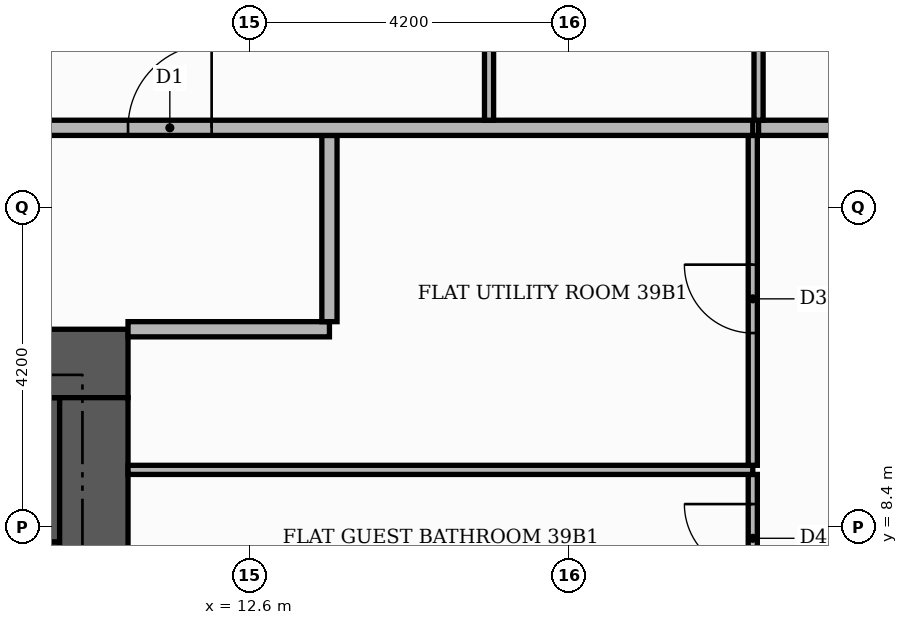
"""IFC4 building model, lengths in metres.
Left out: names, types, materials, properties, quantities, classifications, styles, units other than length and angle.
Written with IfcOpenShell. Run it as: python <this file> out.ifc"""

import sys

from ifc_helpers import new_model, si_unit, direction, frame, frame_2d, origin, place, context, subcontext, project, spatial, rectangle, extrude, element, fill, save


model = new_model("IFC4")
c1 = context("Model", 3, precision=1e-05, world=origin(), true_north=direction((0.0, 1.0)))
c2 = subcontext(c1, "Body", "Model", "MODEL_VIEW")
j1 = project(units=[si_unit("LENGTHUNIT", "METRE"), si_unit("PLANEANGLEUNIT", "RADIAN")], contexts=[c1])
p1 = place(None, origin())
s1 = spatial("IfcSite", under=j1, at=p1, CompositionType="ELEMENT")
p2 = place(p1, origin())
s2 = spatial("IfcBuilding", under=s1, at=p2, CompositionType="ELEMENT")
p3 = place(p2, frame((0.0, 0.0, 165.0)))
s3 = spatial("IfcBuildingStorey", under=s2, at=p3, CompositionType="ELEMENT", Elevation=165.0)
p4 = place(p3, frame((5.5, 9.15, 0.0), z_axis=(0.0, 0.0, 1.0), x_axis=(1.0, 0.0, 0.0)))
e1 = element("IfcWall", 1, at=p4, inside=s3, PredefinedType="SHEAR", context=c2, shape_type="SweptSolid", body=[
    extrude(rectangle(XDim=4.6, YDim=1.9, at=frame_2d((2.3, 0.0))), origin(), (0.0, 0.0, 1.0), 3.48),
])
p5 = place(p3, frame((8.1, 8.1, 0.0), z_axis=(0.0, 0.0, 1.0), x_axis=(1.0, 0.0, 0.0)))
e2 = element("IfcWall", 2, at=p5, inside=s3, PredefinedType="SHEAR", context=c2, shape_type="SweptSolid", body=[
    extrude(rectangle(XDim=2.0, YDim=0.2, at=frame_2d((1.0, 0.0))), origin(), (0.0, 0.0, 1.0), 3.48),
])
p6 = place(p3, frame((-11.0, 10.55, 0.0), z_axis=(0.0, 0.0, 1.0), x_axis=(1.0, 0.0, 0.0)))
e3 = element("IfcWall", 3, at=p6, inside=s3, PredefinedType="SHEAR", context=c2, shape_type="SweptSolid", body=[
    extrude(rectangle(XDim=22.0, YDim=0.9, at=frame_2d((11.0, 0.0))), origin(), (0.0, 0.0, 1.0), 3.48),
])
p7 = place(p6, frame((13.3, 0.0, 0.0)))
e4 = element("IfcOpeningElement", 4, at=p7, cuts=e3, PredefinedType="OPENING", context=c2, shape_type="SweptSolid", body=[
    extrude(rectangle(XDim=1.8, YDim=2.2, at=frame_2d((0.9, 1.1))), frame((0.0, 0.46, 0.0), z_axis=(0.0, -1.0, 0.0), x_axis=(1.0, 0.0, 0.0)), (0.0, 0.0, 1.0), 0.92),
])
p8 = place(p3, frame((10.55, -10.1, 0.0), z_axis=(0.0, 0.0, 1.0), x_axis=(0.0, 1.0, 0.0)))
e5 = element("IfcWall", 5, at=p8, inside=s3, PredefinedType="SHEAR", context=c2, shape_type="SweptSolid", body=[
    extrude(rectangle(XDim=20.2, YDim=0.9, at=frame_2d((10.1, 0.0))), origin(), (0.0, 0.0, 1.0), 3.48),
])
p9 = place(p3, frame((19.22, 7.41, 0.0), z_axis=(0.0, 0.0, 1.0), x_axis=(0.0, 1.0, 0.0)))
e6 = element("IfcWall", 6, at=p9, inside=s3, PredefinedType="PARTITIONING", context=c2, shape_type="SweptSolid", body=[
    extrude(rectangle(XDim=1.68, YDim=0.12, at=frame_2d((0.84, 0.0))), origin(), (0.0, 0.0, 1.0), 3.48),
])
p10 = place(p9, frame((0.39, 0.0, 0.0)))
e7 = element("IfcOpeningElement", 7, at=p10, cuts=e6, PredefinedType="OPENING", context=c2, shape_type="SweptSolid", body=[
    extrude(rectangle(XDim=0.9, YDim=2.1, at=frame_2d((0.45, 1.05))), frame((0.0, 0.07, 0.0), z_axis=(0.0, -1.0, 0.0), x_axis=(1.0, 0.0, 0.0)), (0.0, 0.0, 1.0), 0.14),
])
p11 = place(p3, frame((11.0, 9.15, 0.0), z_axis=(0.0, 0.0, 1.0), x_axis=(1.0, 0.0, 0.0)))
e8 = element("IfcWall", 8, at=p11, inside=s3, PredefinedType="PARTITIONING", context=c2, shape_type="SweptSolid", body=[
    extrude(rectangle(XDim=8.22, YDim=0.12, at=frame_2d((4.11, 0.0))), origin(), (0.0, 0.0, 1.0), 3.48),
])
p12 = place(p3, frame((19.22, 9.21, 0.0), z_axis=(0.0, 0.0, 1.0), x_axis=(0.0, 1.0, 0.0)))
e9 = element("IfcWall", 9, at=p12, inside=s3, PredefinedType="PARTITIONING", context=c2, shape_type="SweptSolid", body=[
    extrude(rectangle(XDim=4.34, YDim=0.12, at=frame_2d((2.17, 0.0))), origin(), (0.0, 0.0, 1.0), 3.48),
])
p13 = place(p12, frame((1.74, 0.0, 0.0)))
e10 = element("IfcOpeningElement", 10, at=p13, cuts=e9, PredefinedType="OPENING", context=c2, shape_type="SweptSolid", body=[
    extrude(rectangle(XDim=0.9, YDim=2.1, at=frame_2d((0.45, 1.05))), frame((0.0, 0.07, 0.0), z_axis=(0.0, -1.0, 0.0), x_axis=(1.0, 0.0, 0.0)), (0.0, 0.0, 1.0), 0.14),
])
p14 = place(p3, frame((11.0, 11.0, 0.0), z_axis=(0.0, 0.0, 1.0), x_axis=(1.0, 0.0, 0.0)))
e11 = element("IfcWall", 11, at=p14, inside=s3, PredefinedType="PARTITIONING", context=c2, shape_type="SweptSolid", body=[
    extrude(rectangle(XDim=2.65, YDim=0.2, at=frame_2d((1.325, 0.0))), origin(), (0.0, 0.0, 1.0), 3.48),
])
p15 = place(p3, frame((13.65, 11.1, 0.0), z_axis=(0.0, 0.0, 1.0), x_axis=(0.0, 1.0, 0.0)))
e12 = element("IfcWall", 12, at=p15, inside=s3, PredefinedType="PARTITIONING", context=c2, shape_type="SweptSolid", body=[
    extrude(rectangle(XDim=2.45, YDim=0.2, at=frame_2d((1.225, 0.0))), origin(), (0.0, 0.0, 1.0), 3.48),
])
p16 = place(p3, frame((-13.65, 13.65, 0.0), z_axis=(0.0, 0.0, 1.0), x_axis=(1.0, 0.0, 0.0)))
e13 = element("IfcWall", 13, at=p16, inside=s3, PredefinedType="PARTITIONING", context=c2, shape_type="SweptSolid", body=[
    extrude(rectangle(XDim=32.87, YDim=0.2, at=frame_2d((16.435, 0.0))), origin(), (0.0, 0.0, 1.0), 3.48),
])
p17 = place(p16, frame((24.65, 0.0, 0.0)))
e14 = element("IfcOpeningElement", 14, at=p17, cuts=e13, PredefinedType="OPENING", context=c2, shape_type="SweptSolid", body=[
    extrude(rectangle(XDim=1.1, YDim=2.4, at=frame_2d((0.55, 1.2))), frame((0.0, 0.11, 0.0), z_axis=(0.0, -1.0, 0.0), x_axis=(1.0, 0.0, 0.0)), (0.0, 0.0, 1.0), 0.22),
])
p18 = place(p16, frame((12.05, 0.0, 0.0)))
e15 = element("IfcOpeningElement", 15, at=p18, cuts=e13, PredefinedType="OPENING", context=c2, shape_type="SweptSolid", body=[
    extrude(rectangle(XDim=1.1, YDim=2.4, at=frame_2d((0.55, 1.2))), frame((0.0, 0.11, 0.0), z_axis=(0.0, -1.0, 0.0), x_axis=(1.0, 0.0, 0.0)), (0.0, 0.0, 1.0), 0.22),
])
p19 = place(p3, frame((19.296, 13.65, 0.0), z_axis=(0.0, 0.0, 1.0), x_axis=(1.0, 0.0, 0.0)))
e16 = element("IfcWall", 16, at=p19, inside=s3, PredefinedType="PARTITIONING", context=c2, shape_type="SweptSolid", body=[
    extrude(rectangle(XDim=6.124, YDim=0.2, at=frame_2d((3.062, 0.0))), origin(), (0.0, 0.0, 1.0), 3.48),
])
p20 = place(p3, frame((15.75, 13.75, 0.0), z_axis=(0.0, 0.0, 1.0), x_axis=(0.0, 1.0, 0.0)))
e17 = element("IfcWall", 17, at=p20, inside=s3, PredefinedType="PARTITIONING", context=c2, shape_type="SweptSolid", body=[
    extrude(rectangle(XDim=6.01, YDim=0.12, at=frame_2d((3.005, 0.0))), origin(), (0.0, 0.0, 1.0), 3.48),
])
p21 = place(p20, frame((2.485, 0.0, 0.0)))
e18 = element("IfcOpeningElement", 18, at=p21, cuts=e17, PredefinedType="OPENING", context=c2, shape_type="SweptSolid", body=[
    extrude(rectangle(XDim=1.0, YDim=2.1, at=frame_2d((0.5, 1.05))), frame((0.0, 0.07, 0.0), z_axis=(0.0, -1.0, 0.0), x_axis=(1.0, 0.0, 0.0)), (0.0, 0.0, 1.0), 0.14),
])
p22 = place(p3, frame((19.296, 13.75, 0.0), z_axis=(0.0, 0.0, 1.0), x_axis=(0.0, 1.0, 0.0)))
e19 = element("IfcWall", 19, at=p22, inside=s3, PredefinedType="PARTITIONING", context=c2, shape_type="SweptSolid", body=[
    extrude(rectangle(XDim=3.75, YDim=0.12, at=frame_2d((1.875, 0.0))), origin(), (0.0, 0.0, 1.0), 3.48),
])
p23 = place(p10, origin())
e20 = element("IfcDoor", 20, at=p23, inside=s3, OperationType="SINGLE_SWING_RIGHT", PredefinedType="DOOR", context=c2, shape_type="SweptSolid", body=[
    extrude(rectangle(XDim=0.9, YDim=2.1, at=frame_2d((0.45, 1.05))), frame((0.0, 0.025, 0.0), z_axis=(0.0, -1.0, 0.0), x_axis=(1.0, 0.0, 0.0)), (0.0, 0.0, 1.0), 0.05),
])
fill(e7, e20)
p24 = place(p13, origin())
e21 = element("IfcDoor", 21, at=p24, inside=s3, OperationType="SINGLE_SWING_RIGHT", PredefinedType="DOOR", context=c2, shape_type="SweptSolid", body=[
    extrude(rectangle(XDim=0.9, YDim=2.1, at=frame_2d((0.45, 1.05))), frame((0.0, 0.025, 0.0), z_axis=(0.0, -1.0, 0.0), x_axis=(1.0, 0.0, 0.0)), (0.0, 0.0, 1.0), 0.05),
])
fill(e10, e21)
p25 = place(p17, origin())
e22 = element("IfcDoor", 22, at=p25, inside=s3, OperationType="SINGLE_SWING_RIGHT", PredefinedType="DOOR", context=c2, shape_type="SweptSolid", body=[
    extrude(rectangle(XDim=1.1, YDim=2.4, at=frame_2d((0.55, 1.2))), frame((0.0, 0.025, 0.0), z_axis=(0.0, -1.0, 0.0), x_axis=(1.0, 0.0, 0.0)), (0.0, 0.0, 1.0), 0.05),
])
fill(e14, e22)
save(model, sys.argv[1])
